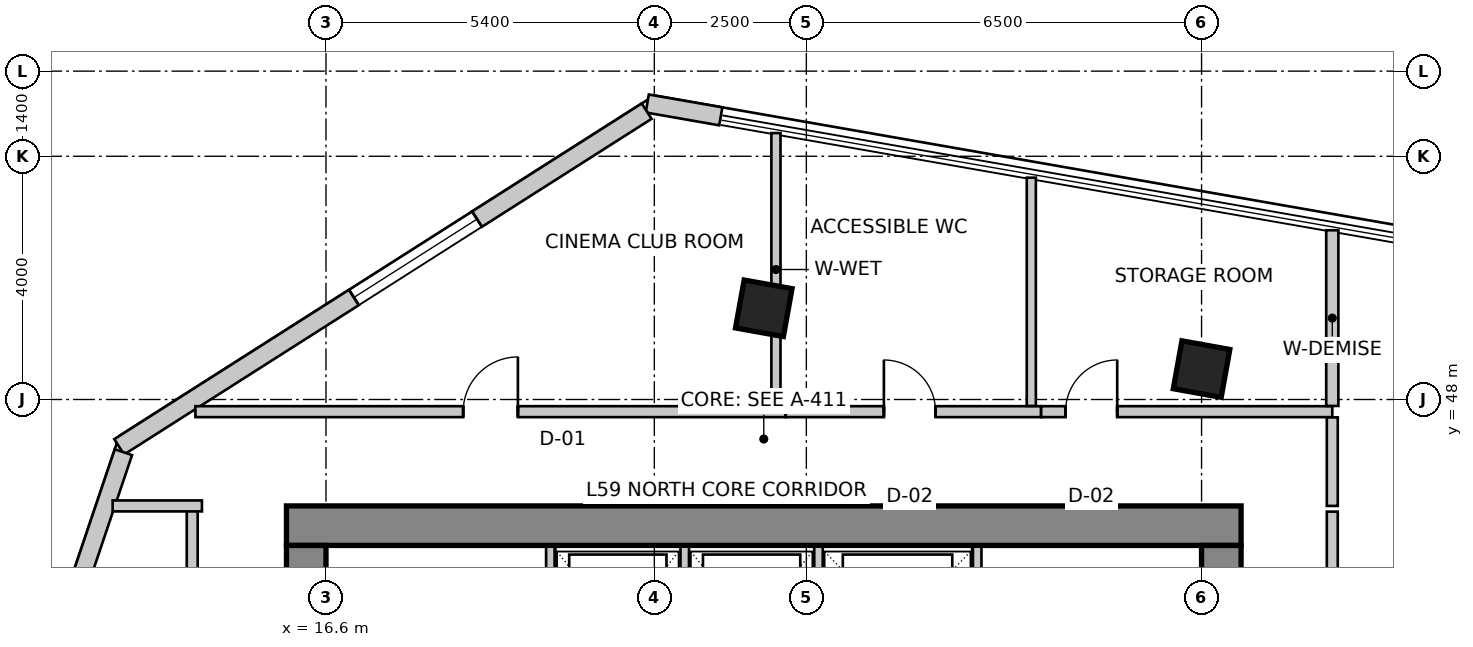
"""IFC4 building model, lengths in metres.
Left out: names, types, materials, properties, quantities, classifications, styles, units other than length and angle.
Written with IfcOpenShell. Run it as: python <this file> out.ifc"""

import sys

from ifc_helpers import new_model, si_unit, direction, frame, frame_2d, origin, origin_2d, place, context, subcontext, project, spatial, rectangle, extrude, source, transform, mapped, element, fill, save


model = new_model("IFC4")
c1 = context("Model", 3, precision=1e-05, world=origin(), true_north=direction((0.0, 1.0)))
c2 = subcontext(c1, "Body", "Model", "MODEL_VIEW")
j1 = project(units=[si_unit("LENGTHUNIT", "METRE"), si_unit("PLANEANGLEUNIT", "RADIAN")], contexts=[c1])
p1 = place(None, origin())
s1 = spatial("IfcSite", under=j1, at=p1, CompositionType="ELEMENT")
p2 = place(p1, origin())
s2 = spatial("IfcBuilding", under=s1, at=p2, CompositionType="ELEMENT")
p3 = place(p2, frame((0.0, 0.0, 232.4)))
s3 = spatial("IfcBuildingStorey", under=s2, at=p3, CompositionType="ELEMENT", Elevation=232.4)
p4 = place(p3, frame((15.95, 45.925, 0.0), z_axis=(0.0, 0.0, 1.0), x_axis=(1.0, 0.0, 0.0)))
e1 = element("IfcWall", 1, at=p4, inside=s3, PredefinedType="SHEAR", context=c2, shape_type="SweptSolid", body=[
    extrude(rectangle(XDim=15.7, YDim=0.65, at=frame_2d((7.85, 0.0))), origin(), (0.0, 0.0, 1.0), 3.5),
])
p5 = place(p3, frame((16.275, 34.2, 0.0), z_axis=(0.0, 0.0, 1.0), x_axis=(0.0, 1.0, 0.0)))
e2 = element("IfcWall", 2, at=p5, inside=s3, PredefinedType="SHEAR", context=c2, shape_type="SweptSolid", body=[
    extrude(rectangle(XDim=11.4, YDim=0.65, at=frame_2d((5.7, 0.0))), origin(), (0.0, 0.0, 1.0), 3.5),
])
m1 = source(origin(), c2, "Body", "SweptSolid", [
    extrude(rectangle(XDim=1.1, YDim=2.15, at=frame_2d((0.55, 1.075))), frame((0.0, 0.335, 0.0), z_axis=(0.0, -1.0, 0.0), x_axis=(1.0, 0.0, 0.0)), (0.0, 0.0, 1.0), 0.67),
])
p6 = place(p5, frame((7.15, 0.0, 0.0)))
e3 = element("IfcOpeningElement", 3, at=p6, cuts=e2, PredefinedType="OPENING", context=c2, shape_type="MappedRepresentation", body=[
    mapped(m1, transform((0.0, 0.0, 0.0), scale=1.0)),
])
p7 = place(p3, frame((31.325, 34.2, 0.0), z_axis=(0.0, 0.0, 1.0), x_axis=(0.0, 1.0, 0.0)))
e4 = element("IfcWall", 4, at=p7, inside=s3, PredefinedType="SHEAR", context=c2, shape_type="SweptSolid", body=[
    extrude(rectangle(XDim=11.4, YDim=0.65, at=frame_2d((5.7, 0.0))), origin(), (0.0, 0.0, 1.0), 3.5),
])
p8 = place(p7, frame((7.35, 0.0, 0.0)))
e5 = element("IfcOpeningElement", 5, at=p8, cuts=e4, PredefinedType="OPENING", context=c2, shape_type="MappedRepresentation", body=[
    mapped(m1, transform((0.0, 0.0, 0.0), scale=1.0)),
])
m2 = source(origin(), c2, "Body", "SweptSolid", [
    extrude(rectangle(XDim=0.8, YDim=0.8, at=origin_2d()), origin(), (0.0, 0.0, 1.0), 3.5),
])
for number, where, z_axis, x_axis in (
    (6, (23.8, 49.5, 0.0), (0.0, 0.0, 1.0), (0.984, -0.177, 0.0)),
    (7, (31.0, 48.5, 0.0), (0.0, 0.0, 1.0), (0.984, -0.177, 0.0)),
):
    element("IfcColumn", number, at=place(p3, frame(where, z_axis=z_axis, x_axis=x_axis)), inside=s3, PredefinedType="COLUMN", context=c2, shape_type="MappedRepresentation", body=[
        mapped(m2, transform((0.0, 0.0, 0.0), scale=1.0)),
    ])
p9 = place(p3, frame((23.093, 52.657, 0.0), z_axis=(0.0, 0.0, 1.0), x_axis=(-0.985090351288, 0.172037785961, 0.0)))
e8 = element("IfcWall", 8, at=p9, inside=s3, PredefinedType="SOLIDWALL", context=c2, shape_type="SweptSolid", body=[
    extrude(rectangle(XDim=1.228, YDim=0.3, at=frame_2d((0.614, 0.0))), origin(), (0.0, 0.0, 1.0), 3.25),
])
p10 = place(p3, frame((21.874, 52.742, 0.0), z_axis=(0.0, 0.0, 1.0), x_axis=(-0.84365659959, -0.536883173482, 0.0)))
e9 = element("IfcWall", 9, at=p10, inside=s3, PredefinedType="SOLIDWALL", context=c2, shape_type="SweptSolid", body=[
    extrude(rectangle(XDim=10.283, YDim=0.3, at=frame_2d((5.142, 0.0))), origin(), (0.0, 0.0, 1.0), 3.25),
])
m3 = source(origin(), c2, "Body", "SweptSolid", [
    extrude(rectangle(XDim=2.4, YDim=2.2, at=frame_2d((1.2, 1.1))), frame((0.0, 0.16, 0.0), z_axis=(0.0, -1.0, 0.0), x_axis=(1.0, 0.0, 0.0)), (0.0, 0.0, 1.0), 0.32),
])
p11 = place(p10, frame((3.307, 0.0, 0.85)))
e10 = element("IfcOpeningElement", 10, at=p11, cuts=e9, PredefinedType="OPENING", context=c2, shape_type="MappedRepresentation", body=[
    mapped(m3, transform((0.0, 0.0, 0.0), scale=1.0)),
])
p12 = place(p3, frame((13.269, 47.134, 0.0), z_axis=(0.0, 0.0, 1.0), x_axis=(-0.319920776449, -0.947444297464, 0.0)))
e11 = element("IfcWall", 11, at=p12, inside=s3, PredefinedType="SOLIDWALL", context=c2, shape_type="SweptSolid", body=[
    extrude(rectangle(XDim=16.133, YDim=0.3, at=frame_2d((8.067, 0.0))), origin(), (0.0, 0.0, 1.0), 3.25),
])
m4 = source(origin(), c2, "Body", "SweptSolid", [
    extrude(rectangle(XDim=2.1, YDim=2.0, at=frame_2d((1.05, 1.0))), frame((0.0, 0.16, 0.0), z_axis=(0.0, -1.0, 0.0), x_axis=(1.0, 0.0, 0.0)), (0.0, 0.0, 1.0), 0.32),
])
p13 = place(p12, frame((2.513, 0.0, 0.85)))
e12 = element("IfcOpeningElement", 12, at=p13, cuts=e11, PredefinedType="OPENING", context=c2, shape_type="MappedRepresentation", body=[
    mapped(m4, transform((0.0, 0.0, 0.0), scale=1.0)),
])
p14 = place(p12, frame((7.26, 0.0, 0.85)))
e13 = element("IfcOpeningElement", 13, at=p14, cuts=e11, PredefinedType="OPENING", context=c2, shape_type="MappedRepresentation", body=[
    mapped(m3, transform((0.0, 0.0, 0.0), scale=1.0)),
])
p15 = place(p12, frame((12.307, 0.0, 0.85)))
e14 = element("IfcOpeningElement", 14, at=p15, cuts=e11, PredefinedType="OPENING", context=c2, shape_type="MappedRepresentation", body=[
    mapped(m4, transform((0.0, 0.0, 0.0), scale=1.0)),
])
for number, where, z_axis, x_axis in (
    (15, (20.29, 43.28, 0.0), (0.0, 0.0, 1.0), (0.0, 1.0, 0.0)),
    (16, (27.31, 43.28, 0.0), (0.0, 0.0, 1.0), (0.0, 1.0, 0.0)),
):
    element("IfcWall", number, at=place(p3, frame(where, z_axis=z_axis, x_axis=x_axis)), inside=s3, PredefinedType="SOLIDWALL", context=c2, shape_type="SweptSolid", body=[
        extrude(rectangle(XDim=2.3, YDim=0.14, at=frame_2d((1.15, 0.0))), origin(), (0.0, 0.0, 1.0), 3.25),
    ])
for number, where, z_axis, x_axis in (
    (17, (22.5, 43.02, 0.0), (0.0, 0.0, 1.0), (0.0, 1.0, 0.0)),
    (18, (24.7, 43.02, 0.0), (0.0, 0.0, 1.0), (0.0, 1.0, 0.0)),
):
    element("IfcWall", number, at=place(p3, frame(where, z_axis=z_axis, x_axis=x_axis)), inside=s3, PredefinedType="SOLIDWALL", context=c2, shape_type="SweptSolid", body=[
        extrude(rectangle(XDim=2.56, YDim=0.14, at=frame_2d((1.28, 0.0))), origin(), (0.0, 0.0, 1.0), 3.25),
    ])
p16 = place(p3, frame((14.4, 33.644, 0.0), z_axis=(0.0, 0.0, 1.0), x_axis=(0.0, 1.0, 0.0)))
e19 = element("IfcWall", 19, at=p16, inside=s3, PredefinedType="PARTITIONING", context=c2, shape_type="SweptSolid", body=[
    extrude(rectangle(XDim=12.606, YDim=0.18, at=frame_2d((6.303, 0.0))), origin(), (0.0, 0.0, 1.0), 3.25),
])
m5 = source(origin(), c2, "Body", "SweptSolid", [
    extrude(rectangle(XDim=0.9, YDim=2.15, at=frame_2d((0.45, 1.075))), frame((0.0, 0.1, 0.0), z_axis=(0.0, -1.0, 0.0), x_axis=(1.0, 0.0, 0.0)), (0.0, 0.0, 1.0), 0.2),
])
p17 = place(p16, frame((4.399, 0.0, 0.0)))
e20 = element("IfcOpeningElement", 20, at=p17, cuts=e19, PredefinedType="OPENING", context=c2, shape_type="MappedRepresentation", body=[
    mapped(m5, transform((0.0, 0.0, 0.0), scale=1.0)),
])
p18 = place(p3, frame((14.56, 46.25, 0.0), z_axis=(0.0, 0.0, 1.0), x_axis=(-1.0, 0.0, 0.0)))
e21 = element("IfcWall", 21, at=p18, inside=s3, PredefinedType="PARTITIONING", context=c2, shape_type="SweptSolid", body=[
    extrude(rectangle(XDim=1.469, YDim=0.18, at=frame_2d((0.734, 0.0))), origin(), (0.0, 0.0, 1.0), 3.25),
])
p19 = place(p3, frame((14.453, 47.8, 0.0), z_axis=(0.0, 0.0, 1.0), x_axis=(1.0, 0.0, 0.0)))
e22 = element("IfcWall", 22, at=p19, inside=s3, PredefinedType="PARTITIONING", context=c2, shape_type="SweptSolid", body=[
    extrude(rectangle(XDim=9.707, YDim=0.18, at=frame_2d((4.854, 0.0))), origin(), (0.0, 0.0, 1.0), 2.934),
])
p20 = place(p19, frame((4.404, 0.0, 0.0)))
e23 = element("IfcOpeningElement", 23, at=p20, cuts=e22, PredefinedType="OPENING", context=c2, shape_type="MappedRepresentation", body=[
    mapped(m5, transform((0.0, 0.0, 0.0), scale=1.0)),
])
p21 = place(p3, frame((24.162, 47.8, 0.0), z_axis=(0.0, 0.0, 1.0), x_axis=(1.0, 0.0, 0.0)))
e24 = element("IfcWall", 24, at=p21, inside=s3, PredefinedType="PARTITIONING", context=c2, shape_type="SweptSolid", body=[
    extrude(rectangle(XDim=4.198, YDim=0.18, at=frame_2d((2.099, 0.0))), origin(), (0.0, 0.0, 1.0), 3.25),
])
m6 = source(origin(), c2, "Body", "SweptSolid", [
    extrude(rectangle(XDim=0.85, YDim=2.15, at=frame_2d((0.425, 1.075))), frame((0.0, 0.1, 0.0), z_axis=(0.0, -1.0, 0.0), x_axis=(1.0, 0.0, 0.0)), (0.0, 0.0, 1.0), 0.2),
])
p22 = place(p21, frame((1.613, 0.0, 0.0)))
e25 = element("IfcOpeningElement", 25, at=p22, cuts=e24, PredefinedType="OPENING", context=c2, shape_type="MappedRepresentation", body=[
    mapped(m6, transform((0.0, 0.0, 0.0), scale=1.0)),
])
p23 = place(p3, frame((28.362, 47.8, 0.0), z_axis=(0.0, 0.0, 1.0), x_axis=(1.0, 0.0, 0.0)))
e26 = element("IfcWall", 26, at=p23, inside=s3, PredefinedType="PARTITIONING", context=c2, shape_type="SweptSolid", body=[
    extrude(rectangle(XDim=4.788, YDim=0.18, at=frame_2d((2.394, 0.0))), origin(), (0.0, 0.0, 1.0), 2.822),
])
p24 = place(p23, frame((0.401, 0.0, 0.0)))
e27 = element("IfcOpeningElement", 27, at=p24, cuts=e26, PredefinedType="OPENING", context=c2, shape_type="MappedRepresentation", body=[
    mapped(m6, transform((0.0, 0.0, 0.0), scale=1.0)),
])
p25 = place(p3, frame((33.15, 47.706, 0.0), z_axis=(0.0, 0.0, 1.0), x_axis=(0.0, -1.0, 0.0)))
e28 = element("IfcWall", 28, at=p25, inside=s3, PredefinedType="PARTITIONING", context=c2, shape_type="SweptSolid", body=[
    extrude(rectangle(XDim=1.456, YDim=0.18, at=frame_2d((0.728, 0.0))), origin(), (0.0, 0.0, 1.0), 2.934),
])
p26 = place(p3, frame((33.15, 46.156, 0.0), z_axis=(0.0, 0.0, 1.0), x_axis=(0.0, -1.0, 0.0)))
e29 = element("IfcWall", 29, at=p26, inside=s3, PredefinedType="PARTITIONING", context=c2, shape_type="SweptSolid", body=[
    extrude(rectangle(XDim=4.733, YDim=0.18, at=frame_2d((2.366, 0.0))), origin(), (0.0, 0.0, 1.0), 2.822),
])
p27 = place(p26, frame((1.856, 0.0, 0.0)))
e30 = element("IfcOpeningElement", 30, at=p27, cuts=e29, PredefinedType="OPENING", context=c2, shape_type="MappedRepresentation", body=[
    mapped(m5, transform((0.0, 0.0, 0.0), scale=1.0)),
])
p28 = place(p3, frame((24.0, 52.382, 0.0), z_axis=(0.0, 0.0, 1.0), x_axis=(0.0, -1.0, 0.0)))
e31 = element("IfcWall", 31, at=p28, inside=s3, PredefinedType="PARTITIONING", context=c2, shape_type="SweptSolid", body=[
    extrude(rectangle(XDim=4.488, YDim=0.15, at=frame_2d((2.244, 0.0))), origin(), (0.0, 0.0, 1.0), 2.542),
])
p29 = place(p3, frame((28.2, 51.648, 0.0), z_axis=(0.0, 0.0, 1.0), x_axis=(0.0, -1.0, 0.0)))
e32 = element("IfcWall", 32, at=p29, inside=s3, PredefinedType="PARTITIONING", context=c2, shape_type="SweptSolid", body=[
    extrude(rectangle(XDim=3.754, YDim=0.15, at=frame_2d((1.877, 0.0))), origin(), (0.0, 0.0, 1.0), 2.542),
])
p30 = place(p3, frame((33.15, 50.783, 0.0), z_axis=(0.0, 0.0, 1.0), x_axis=(0.0, -1.0, 0.0)))
e33 = element("IfcWall", 33, at=p30, inside=s3, PredefinedType="PARTITIONING", context=c2, shape_type="SweptSolid", body=[
    extrude(rectangle(XDim=2.889, YDim=0.2, at=frame_2d((1.445, 0.0))), origin(), (0.0, 0.0, 1.0), 2.542),
])
m7 = source(origin(), c2, "Body", "SweptSolid", [
    extrude(rectangle(XDim=2.4, YDim=2.2, at=frame_2d((1.2, 1.1))), frame((0.0, -0.015, 0.0), z_axis=(0.0, -1.0, 0.0), x_axis=(1.0, 0.0, 0.0)), (0.0, 0.0, 1.0), 0.06),
])
p31 = place(p11, origin())
e34 = element("IfcWindow", 34, at=p31, inside=s3, PartitioningType="SINGLE_PANEL", PredefinedType="WINDOW", context=c2, shape_type="MappedRepresentation", body=[
    mapped(m7, transform((0.0, 0.0, 0.0), scale=1.0)),
])
fill(e10, e34)
m8 = source(origin(), c2, "Body", "SweptSolid", [
    extrude(rectangle(XDim=0.9, YDim=2.15, at=frame_2d((0.45, 1.075))), frame((0.0, 0.025, 0.0), z_axis=(0.0, -1.0, 0.0), x_axis=(1.0, 0.0, 0.0)), (0.0, 0.0, 1.0), 0.05),
])
p32 = place(p20, origin())
e35 = element("IfcDoor", 35, at=p32, inside=s3, OperationType="SINGLE_SWING_RIGHT", PredefinedType="DOOR", context=c2, shape_type="MappedRepresentation", body=[
    mapped(m8, transform((0.0, 0.0, 0.0), scale=1.0)),
])
fill(e23, e35)
m9 = source(origin(), c2, "Body", "SweptSolid", [
    extrude(rectangle(XDim=0.85, YDim=2.15, at=frame_2d((0.425, 1.075))), frame((0.0, 0.025, 0.0), z_axis=(0.0, -1.0, 0.0), x_axis=(1.0, 0.0, 0.0)), (0.0, 0.0, 1.0), 0.05),
])
p33 = place(p22, origin())
e36 = element("IfcDoor", 36, at=p33, inside=s3, OperationType="SINGLE_SWING_LEFT", PredefinedType="DOOR", context=c2, shape_type="MappedRepresentation", body=[
    mapped(m9, transform((0.0, 0.0, 0.0), scale=1.0)),
])
fill(e25, e36)
p34 = place(p24, origin())
e37 = element("IfcDoor", 37, at=p34, inside=s3, OperationType="SINGLE_SWING_RIGHT", PredefinedType="DOOR", context=c2, shape_type="MappedRepresentation", body=[
    mapped(m9, transform((0.0, 0.0, 0.0), scale=1.0)),
])
fill(e27, e37)
save(model, sys.argv[1])
